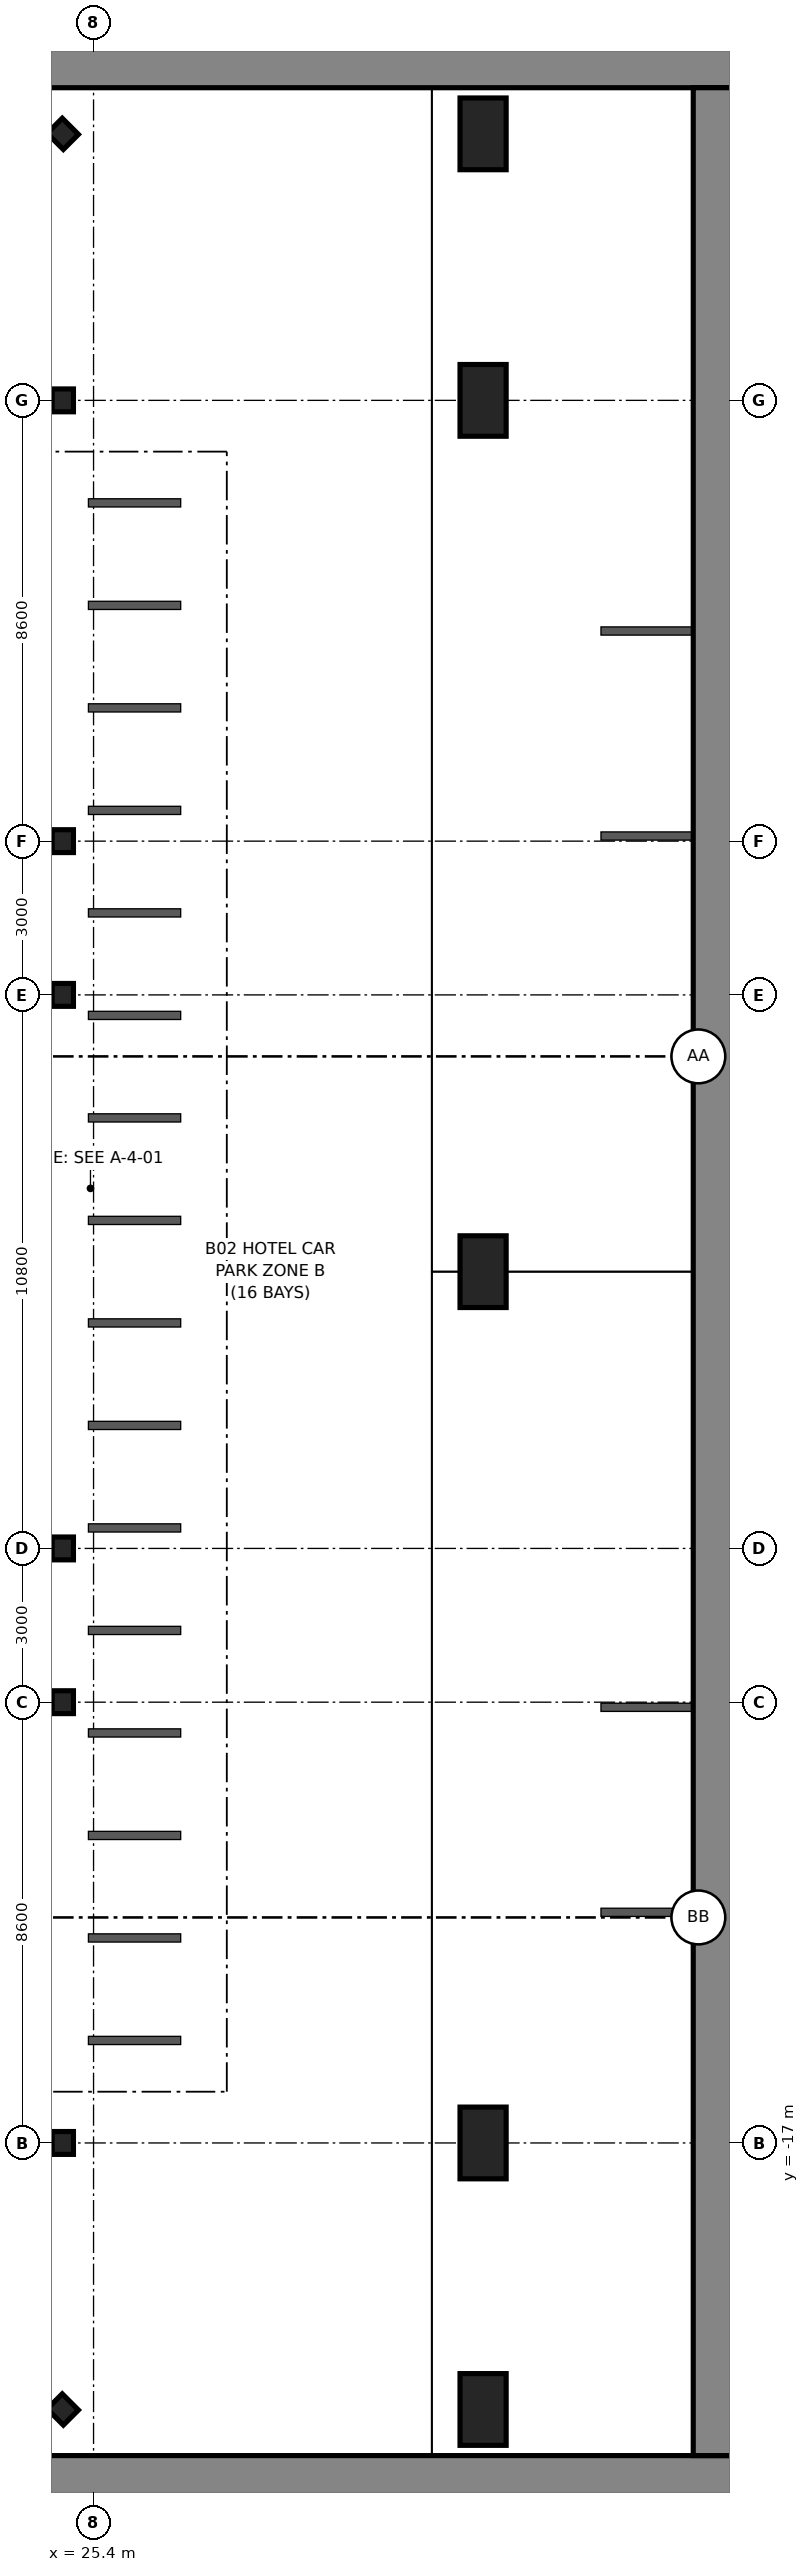
"""IFC4 building model, lengths in metres.
Left out: names, types, materials, properties, quantities, classifications, styles, units other than length and angle.
Written with IfcOpenShell. Run it as: python <this file> out.ifc"""

import sys

from ifc_helpers import new_model, si_unit, direction, frame, frame_2d, origin, origin_2d, place, context, subcontext, project, spatial, rectangle, i_section, extrude, source, transform, mapped, element, save


model = new_model("IFC4")
c1 = context("Model", 3, precision=1e-05, world=origin(), true_north=direction((0.0, 1.0)))
c2 = subcontext(c1, "Body", "Model", "MODEL_VIEW")
j1 = project(units=[si_unit("LENGTHUNIT", "METRE"), si_unit("PLANEANGLEUNIT", "RADIAN")], contexts=[c1])
p1 = place(None, origin())
s1 = spatial("IfcSite", under=j1, at=p1, CompositionType="ELEMENT")
p2 = place(p1, origin())
s2 = spatial("IfcBuilding", under=s1, at=p2, CompositionType="ELEMENT")
p3 = place(p2, frame((0.0, 0.0, -10.8)))
s3 = spatial("IfcBuildingStorey", under=s2, at=p3, CompositionType="ELEMENT", Elevation=-10.8)
m1 = source(origin(), c2, "Body", "SweptSolid", [
    extrude(rectangle(XDim=76.0, YDim=0.9, at=frame_2d((38.0, 0.0))), origin(), (0.0, 0.0, 1.0), 4.98),
])
for number, where, z_axis, x_axis in (
    (1, (-38.0, -23.55, 0.0), (0.0, 0.0, 1.0), (1.0, 0.0, 0.0)),
    (2, (-38.0, 23.55, 0.0), (0.0, 0.0, 1.0), (1.0, 0.0, 0.0)),
):
    element("IfcWall", number, at=place(p3, frame(where, z_axis=z_axis, x_axis=x_axis)), inside=s3, PredefinedType="SHEAR", context=c2, shape_type="MappedRepresentation", body=[
        mapped(m1, transform((0.0, 0.0, 0.0), scale=1.0)),
    ])
m2 = source(origin(), c2, "Body", "SweptSolid", [
    extrude(rectangle(XDim=46.2, YDim=0.9, at=frame_2d((23.1, 0.0))), origin(), (0.0, 0.0, 1.0), 4.98),
])
p4 = place(p3, frame((37.55, -23.1, 0.0), z_axis=(0.0, 0.0, 1.0), x_axis=(0.0, 1.0, 0.0)))
e3 = element("IfcWall", 3, at=p4, inside=s3, PredefinedType="SHEAR", context=c2, shape_type="MappedRepresentation", body=[
    mapped(m2, transform((0.0, 0.0, 0.0), scale=1.0)),
])
m3 = source(origin(), c2, "Body", "SweptSolid", [
    extrude(rectangle(XDim=0.9, YDim=1.4, at=origin_2d()), origin(), (0.0, 0.0, 1.0), 5.355),
])
for number, where, z_axis, x_axis in (
    (4, (33.0, -22.2, 0.0), (0.0, 0.0, 1.0), (1.0, 0.0, 0.0)),
    (5, (33.0, -17.0, 0.0), (0.0, 0.0, 1.0), (1.0, 0.0, 0.0)),
    (6, (33.0, 0.0, 0.0), (0.0, 0.0, 1.0), (1.0, 0.0, 0.0)),
    (7, (33.0, 17.0, 0.0), (0.0, 0.0, 1.0), (1.0, 0.0, 0.0)),
    (8, (33.0, 22.2, 0.0), (0.0, 0.0, 1.0), (1.0, 0.0, 0.0)),
):
    element("IfcColumn", number, at=place(p3, frame(where, z_axis=z_axis, x_axis=x_axis)), inside=s3, PredefinedType="PILASTER", context=c2, shape_type="MappedRepresentation", body=[
        mapped(m3, transform((0.0, 0.0, 0.0), scale=1.0)),
    ])
m4 = source(origin(), c2, "Body", "SweptSolid", [
    extrude(i_section(OverallWidth=0.416, OverallDepth=0.446, WebThickness=0.025, FlangeThickness=0.04, at=origin_2d()), origin(), (0.0, 0.0, 1.0), 5.355),
])
for number, where, z_axis, x_axis in (
    (9, (24.8, -17.0, 0.0), (0.0, 0.0, 1.0), (1.0, 0.0, 0.0)),
    (10, (24.8, -8.4, 0.0), (0.0, 0.0, 1.0), (1.0, 0.0, 0.0)),
    (11, (24.8, -5.4, 0.0), (0.0, 0.0, 1.0), (1.0, 0.0, 0.0)),
    (12, (24.8, 5.4, 0.0), (0.0, 0.0, 1.0), (1.0, 0.0, 0.0)),
    (13, (24.8, 8.4, 0.0), (0.0, 0.0, 1.0), (1.0, 0.0, 0.0)),
    (14, (24.8, 17.0, 0.0), (0.0, 0.0, 1.0), (1.0, 0.0, 0.0)),
    (15, (24.8, -22.2, 0.0), (0.0, 0.0, 1.0), (0.707, 0.707, 0.0)),
    (16, (24.8, 22.2, 0.0), (0.0, 0.0, 1.0), (0.707, 0.707, 0.0)),
):
    element("IfcColumn", number, at=place(p3, frame(where, z_axis=z_axis, x_axis=x_axis)), inside=s3, PredefinedType="COLUMN", context=c2, shape_type="MappedRepresentation", body=[
        mapped(m4, transform((0.0, 0.0, 0.0), scale=1.0)),
    ])
save(model, sys.argv[1])
